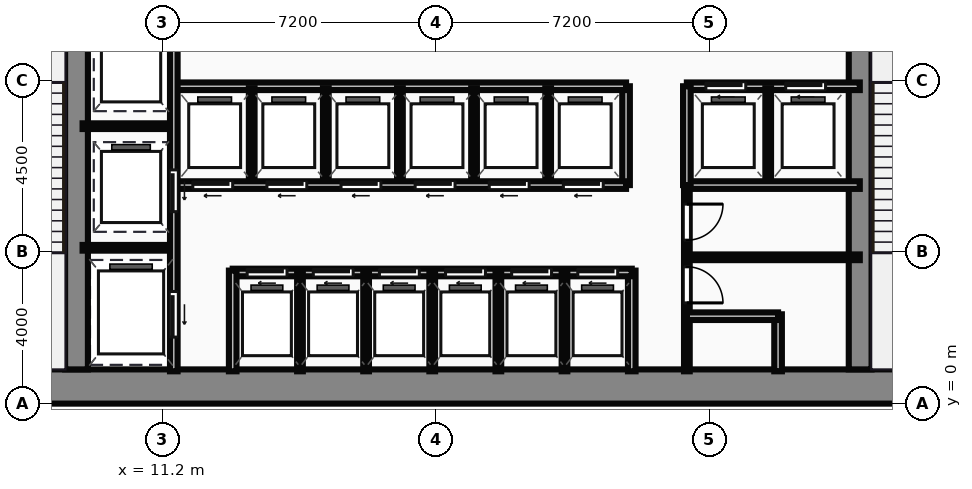
"""IFC4 building model, lengths in metres.
Left out: names, types, materials, properties, quantities, classifications, styles, units other than length and angle.
Written with IfcOpenShell. Run it as: python <this file> out.ifc"""

import sys

from ifc_helpers import new_model, si_unit, direction, frame, frame_2d, origin, place, context, subcontext, project, spatial, rectangle, extrude, source, transform, mapped, element, fill, save


model = new_model("IFC4")
c1 = context("Model", 3, precision=1e-05, world=origin(), true_north=direction((0.0, 1.0)))
c2 = subcontext(c1, "Body", "Model", "MODEL_VIEW")
j1 = project(units=[si_unit("LENGTHUNIT", "METRE"), si_unit("PLANEANGLEUNIT", "RADIAN")], contexts=[c1])
p1 = place(None, origin())
s1 = spatial("IfcSite", under=j1, at=p1, CompositionType="ELEMENT")
p2 = place(p1, origin())
s2 = spatial("IfcBuilding", under=s1, at=p2, CompositionType="ELEMENT")
p3 = place(p2, origin())
s3 = spatial("IfcBuildingStorey", under=s2, at=p3, CompositionType="ELEMENT", Elevation=0.0)
m1 = source(origin(), c2, "Body", "SweptSolid", [
    extrude(rectangle(XDim=29.5, YDim=0.9, at=frame_2d((14.75, 0.0))), origin(), (0.0, 0.0, 1.0), 6.0),
])
p4 = place(p3, frame((4.5, 0.45, 0.0), z_axis=(0.0, 0.0, 1.0), x_axis=(1.0, 0.0, 0.0)))
e1 = element("IfcWall", 1, at=p4, inside=s3, PredefinedType="SHEAR", context=c2, shape_type="MappedRepresentation", body=[
    mapped(m1, transform((0.0, 0.0, 0.0))),
])
m2 = source(origin(), c2, "Body", "SweptSolid", [
    extrude(rectangle(XDim=12.2, YDim=0.6, at=frame_2d((6.1, 0.0))), origin(), (0.0, 0.0, 1.0), 6.0),
])
for number, where, z_axis, x_axis in (
    (2, (8.94, 0.9, 0.0), (0.0, 0.0, 1.0), (0.0, 1.0, 0.0)),
    (3, (29.56, 0.9, 0.0), (0.0, 0.0, 1.0), (0.0, 1.0, 0.0)),
):
    element("IfcWall", number, at=place(p3, frame(where, z_axis=z_axis, x_axis=x_axis)), inside=s3, PredefinedType="SHEAR", context=c2, shape_type="MappedRepresentation", body=[
        mapped(m2, transform((0.0, 0.0, 0.0))),
    ])
m3 = source(origin(), c2, "Body", "SweptSolid", [
    extrude(rectangle(XDim=9.6, YDim=0.2, at=frame_2d((4.8, 0.0))), origin(), (0.0, 0.0, 1.0), 5.7),
])
p5 = place(p3, frame((11.5, 0.85, 0.0), z_axis=(0.0, 0.0, 1.0), x_axis=(0.0, 1.0, 0.0)))
e4 = element("IfcWall", 4, at=p5, inside=s3, PredefinedType="PARTITIONING", context=c2, shape_type="MappedRepresentation", body=[
    mapped(m3, transform((0.0, 0.0, 0.0))),
])
p6 = place(p5, frame((4.2, 0.0, 0.0)))
e5 = element("IfcOpeningElement", 5, at=p6, cuts=e4, PredefinedType="OPENING", context=c2, shape_type="SweptSolid", body=[
    extrude(rectangle(XDim=1.1, YDim=2.15, at=frame_2d((0.55, 1.075))), frame((0.0, 0.11, 0.0), z_axis=(0.0, -1.0, 0.0), x_axis=(1.0, 0.0, 0.0)), (0.0, 0.0, 1.0), 0.22),
])
p7 = place(p5, frame((0.9, 0.0, 0.0)))
e6 = element("IfcOpeningElement", 6, at=p7, cuts=e4, PredefinedType="OPENING", context=c2, shape_type="SweptSolid", body=[
    extrude(rectangle(XDim=1.2, YDim=2.15, at=frame_2d((0.6, 1.075))), frame((0.0, 0.11, 0.0), z_axis=(0.0, -1.0, 0.0), x_axis=(1.0, 0.0, 0.0)), (0.0, 0.0, 1.0), 0.22),
])
m4 = source(origin(), c2, "Body", "SweptSolid", [
    extrude(rectangle(XDim=2.4, YDim=0.15, at=frame_2d((1.2, 0.0))), origin(), (0.0, 0.0, 1.0), 5.7),
])
for number, where, z_axis, x_axis in (
    (7, (9.1, 4.1, 0.0), (0.0, 0.0, 1.0), (1.0, 0.0, 0.0)),
    (8, (9.1, 7.3, 0.0), (0.0, 0.0, 1.0), (1.0, 0.0, 0.0)),
):
    element("IfcWall", number, at=place(p3, frame(where, z_axis=z_axis, x_axis=x_axis)), inside=s3, PredefinedType="PARTITIONING", context=c2, shape_type="MappedRepresentation", body=[
        mapped(m4, transform((0.0, 0.0, 0.0))),
    ])
m5 = source(origin(), c2, "Body", "SweptSolid", [
    extrude(rectangle(XDim=2.65, YDim=0.2, at=frame_2d((1.325, 0.0))), origin(), (0.0, 0.0, 1.0), 5.7),
])
p8 = place(p3, frame((13.05, 0.85, 0.0), z_axis=(0.0, 0.0, 1.0), x_axis=(0.0, 1.0, 0.0)))
e9 = element("IfcWall", 9, at=p8, inside=s3, PredefinedType="PARTITIONING", context=c2, shape_type="MappedRepresentation", body=[
    mapped(m5, transform((0.0, 0.0, 0.0))),
])
m6 = source(origin(), c2, "Body", "SweptSolid", [
    extrude(rectangle(XDim=10.5, YDim=0.2, at=frame_2d((5.25, 0.0))), origin(), (0.0, 0.0, 1.0), 5.7),
])
p9 = place(p3, frame((13.05, 3.45, 0.0), z_axis=(0.0, 0.0, 1.0), x_axis=(1.0, 0.0, 0.0)))
e10 = element("IfcWall", 10, at=p9, inside=s3, PredefinedType="PARTITIONING", context=c2, shape_type="MappedRepresentation", body=[
    mapped(m6, transform((0.0, 0.0, 0.0))),
])
p10 = place(p9, frame((0.38, 0.0, 0.0)))
e11 = element("IfcOpeningElement", 11, at=p10, cuts=e10, PredefinedType="OPENING", context=c2, shape_type="SweptSolid", body=[
    extrude(rectangle(XDim=1.05, YDim=2.15, at=frame_2d((0.525, 1.075))), frame((0.0, 0.11, 0.0), z_axis=(0.0, -1.0, 0.0), x_axis=(1.0, 0.0, 0.0)), (0.0, 0.0, 1.0), 0.22),
])
p11 = place(p9, frame((2.12, 0.0, 0.0)))
e12 = element("IfcOpeningElement", 12, at=p11, cuts=e10, PredefinedType="OPENING", context=c2, shape_type="SweptSolid", body=[
    extrude(rectangle(XDim=1.05, YDim=2.15, at=frame_2d((0.525, 1.075))), frame((0.0, 0.11, 0.0), z_axis=(0.0, -1.0, 0.0), x_axis=(1.0, 0.0, 0.0)), (0.0, 0.0, 1.0), 0.22),
])
p12 = place(p9, frame((3.86, 0.0, 0.0)))
e13 = element("IfcOpeningElement", 13, at=p12, cuts=e10, PredefinedType="OPENING", context=c2, shape_type="SweptSolid", body=[
    extrude(rectangle(XDim=1.05, YDim=2.15, at=frame_2d((0.525, 1.075))), frame((0.0, 0.11, 0.0), z_axis=(0.0, -1.0, 0.0), x_axis=(1.0, 0.0, 0.0)), (0.0, 0.0, 1.0), 0.22),
])
p13 = place(p9, frame((5.6, 0.0, 0.0)))
e14 = element("IfcOpeningElement", 14, at=p13, cuts=e10, PredefinedType="OPENING", context=c2, shape_type="SweptSolid", body=[
    extrude(rectangle(XDim=1.05, YDim=2.15, at=frame_2d((0.525, 1.075))), frame((0.0, 0.11, 0.0), z_axis=(0.0, -1.0, 0.0), x_axis=(1.0, 0.0, 0.0)), (0.0, 0.0, 1.0), 0.22),
])
p14 = place(p9, frame((7.34, 0.0, 0.0)))
e15 = element("IfcOpeningElement", 15, at=p14, cuts=e10, PredefinedType="OPENING", context=c2, shape_type="SweptSolid", body=[
    extrude(rectangle(XDim=1.05, YDim=2.15, at=frame_2d((0.525, 1.075))), frame((0.0, 0.11, 0.0), z_axis=(0.0, -1.0, 0.0), x_axis=(1.0, 0.0, 0.0)), (0.0, 0.0, 1.0), 0.22),
])
p15 = place(p9, frame((9.08, 0.0, 0.0)))
e16 = element("IfcOpeningElement", 16, at=p15, cuts=e10, PredefinedType="OPENING", context=c2, shape_type="SweptSolid", body=[
    extrude(rectangle(XDim=1.05, YDim=2.15, at=frame_2d((0.525, 1.075))), frame((0.0, 0.11, 0.0), z_axis=(0.0, -1.0, 0.0), x_axis=(1.0, 0.0, 0.0)), (0.0, 0.0, 1.0), 0.22),
])
p16 = place(p3, frame((23.55, 0.85, 0.0), z_axis=(0.0, 0.0, 1.0), x_axis=(0.0, 1.0, 0.0)))
e17 = element("IfcWall", 17, at=p16, inside=s3, PredefinedType="PARTITIONING", context=c2, shape_type="MappedRepresentation", body=[
    mapped(m5, transform((0.0, 0.0, 0.0))),
])
m7 = source(origin(), c2, "Body", "SweptSolid", [
    extrude(rectangle(XDim=2.6, YDim=0.15, at=frame_2d((1.3, 0.0))), origin(), (0.0, 0.0, 1.0), 5.7),
])
for number, where, z_axis, x_axis in (
    (18, (14.82, 0.85, 0.0), (0.0, 0.0, 1.0), (0.0, 1.0, 0.0)),
    (19, (16.56, 0.85, 0.0), (0.0, 0.0, 1.0), (0.0, 1.0, 0.0)),
    (20, (18.3, 0.85, 0.0), (0.0, 0.0, 1.0), (0.0, 1.0, 0.0)),
    (21, (20.04, 0.85, 0.0), (0.0, 0.0, 1.0), (0.0, 1.0, 0.0)),
    (22, (21.78, 0.85, 0.0), (0.0, 0.0, 1.0), (0.0, 1.0, 0.0)),
):
    element("IfcWall", number, at=place(p3, frame(where, z_axis=z_axis, x_axis=x_axis)), inside=s3, PredefinedType="PARTITIONING", context=c2, shape_type="MappedRepresentation", body=[
        mapped(m7, transform((0.0, 0.0, 0.0))),
    ])
m8 = source(origin(), c2, "Body", "SweptSolid", [
    extrude(rectangle(XDim=11.85, YDim=0.2, at=frame_2d((5.925, 0.0))), origin(), (0.0, 0.0, 1.0), 5.7),
])
p17 = place(p3, frame((11.55, 5.75, 0.0), z_axis=(0.0, 0.0, 1.0), x_axis=(1.0, 0.0, 0.0)))
e23 = element("IfcWall", 23, at=p17, inside=s3, PredefinedType="PARTITIONING", context=c2, shape_type="MappedRepresentation", body=[
    mapped(m8, transform((0.0, 0.0, 0.0))),
])
p18 = place(p17, frame((0.45, 0.0, 0.0)))
e24 = element("IfcOpeningElement", 24, at=p18, cuts=e23, PredefinedType="OPENING", context=c2, shape_type="SweptSolid", body=[
    extrude(rectangle(XDim=1.05, YDim=2.15, at=frame_2d((0.525, 1.075))), frame((0.0, 0.11, 0.0), z_axis=(0.0, -1.0, 0.0), x_axis=(1.0, 0.0, 0.0)), (0.0, 0.0, 1.0), 0.22),
])
p19 = place(p17, frame((2.4, 0.0, 0.0)))
e25 = element("IfcOpeningElement", 25, at=p19, cuts=e23, PredefinedType="OPENING", context=c2, shape_type="SweptSolid", body=[
    extrude(rectangle(XDim=1.05, YDim=2.15, at=frame_2d((0.525, 1.075))), frame((0.0, 0.11, 0.0), z_axis=(0.0, -1.0, 0.0), x_axis=(1.0, 0.0, 0.0)), (0.0, 0.0, 1.0), 0.22),
])
p20 = place(p17, frame((4.35, 0.0, 0.0)))
e26 = element("IfcOpeningElement", 26, at=p20, cuts=e23, PredefinedType="OPENING", context=c2, shape_type="SweptSolid", body=[
    extrude(rectangle(XDim=1.05, YDim=2.15, at=frame_2d((0.525, 1.075))), frame((0.0, 0.11, 0.0), z_axis=(0.0, -1.0, 0.0), x_axis=(1.0, 0.0, 0.0)), (0.0, 0.0, 1.0), 0.22),
])
p21 = place(p17, frame((6.3, 0.0, 0.0)))
e27 = element("IfcOpeningElement", 27, at=p21, cuts=e23, PredefinedType="OPENING", context=c2, shape_type="SweptSolid", body=[
    extrude(rectangle(XDim=1.05, YDim=2.15, at=frame_2d((0.525, 1.075))), frame((0.0, 0.11, 0.0), z_axis=(0.0, -1.0, 0.0), x_axis=(1.0, 0.0, 0.0)), (0.0, 0.0, 1.0), 0.22),
])
p22 = place(p17, frame((8.25, 0.0, 0.0)))
e28 = element("IfcOpeningElement", 28, at=p22, cuts=e23, PredefinedType="OPENING", context=c2, shape_type="SweptSolid", body=[
    extrude(rectangle(XDim=1.05, YDim=2.15, at=frame_2d((0.525, 1.075))), frame((0.0, 0.11, 0.0), z_axis=(0.0, -1.0, 0.0), x_axis=(1.0, 0.0, 0.0)), (0.0, 0.0, 1.0), 0.22),
])
p23 = place(p17, frame((10.2, 0.0, 0.0)))
e29 = element("IfcOpeningElement", 29, at=p23, cuts=e23, PredefinedType="OPENING", context=c2, shape_type="SweptSolid", body=[
    extrude(rectangle(XDim=1.05, YDim=2.15, at=frame_2d((0.525, 1.075))), frame((0.0, 0.11, 0.0), z_axis=(0.0, -1.0, 0.0), x_axis=(1.0, 0.0, 0.0)), (0.0, 0.0, 1.0), 0.22),
])
p24 = place(p3, frame((11.55, 8.35, 0.0), z_axis=(0.0, 0.0, 1.0), x_axis=(1.0, 0.0, 0.0)))
e30 = element("IfcWall", 30, at=p24, inside=s3, PredefinedType="PARTITIONING", context=c2, shape_type="MappedRepresentation", body=[
    mapped(m8, transform((0.0, 0.0, 0.0))),
])
m9 = source(origin(), c2, "Body", "SweptSolid", [
    extrude(rectangle(XDim=2.6, YDim=0.2, at=frame_2d((1.3, 0.0))), origin(), (0.0, 0.0, 1.0), 5.7),
])
p25 = place(p3, frame((23.4, 5.75, 0.0), z_axis=(0.0, 0.0, 1.0), x_axis=(0.0, 1.0, 0.0)))
e31 = element("IfcWall", 31, at=p25, inside=s3, PredefinedType="PARTITIONING", context=c2, shape_type="MappedRepresentation", body=[
    mapped(m9, transform((0.0, 0.0, 0.0))),
])
m10 = source(origin(), c2, "Body", "SweptSolid", [
    extrude(rectangle(XDim=2.5, YDim=0.15, at=frame_2d((1.25, 0.0))), origin(), (0.0, 0.0, 1.0), 5.7),
])
for number, where, z_axis, x_axis in (
    (32, (13.55, 5.8, 0.0), (0.0, 0.0, 1.0), (0.0, 1.0, 0.0)),
    (33, (15.5, 5.8, 0.0), (0.0, 0.0, 1.0), (0.0, 1.0, 0.0)),
    (34, (17.45, 5.8, 0.0), (0.0, 0.0, 1.0), (0.0, 1.0, 0.0)),
    (35, (19.4, 5.8, 0.0), (0.0, 0.0, 1.0), (0.0, 1.0, 0.0)),
    (36, (21.35, 5.8, 0.0), (0.0, 0.0, 1.0), (0.0, 1.0, 0.0)),
):
    element("IfcWall", number, at=place(p3, frame(where, z_axis=z_axis, x_axis=x_axis)), inside=s3, PredefinedType="PARTITIONING", context=c2, shape_type="MappedRepresentation", body=[
        mapped(m10, transform((0.0, 0.0, 0.0))),
    ])
m11 = source(origin(), c2, "Body", "SweptSolid", [
    extrude(rectangle(XDim=4.55, YDim=0.2, at=frame_2d((2.275, 0.0))), origin(), (0.0, 0.0, 1.0), 5.7),
])
p26 = place(p3, frame((25.0, 8.35, 0.0), z_axis=(0.0, 0.0, 1.0), x_axis=(1.0, 0.0, 0.0)))
e37 = element("IfcWall", 37, at=p26, inside=s3, PredefinedType="PARTITIONING", context=c2, shape_type="MappedRepresentation", body=[
    mapped(m11, transform((0.0, 0.0, 0.0))),
])
p27 = place(p26, frame((0.5, 0.0, 0.0)))
e38 = element("IfcOpeningElement", 38, at=p27, cuts=e37, PredefinedType="OPENING", context=c2, shape_type="SweptSolid", body=[
    extrude(rectangle(XDim=1.05, YDim=2.15, at=frame_2d((0.525, 1.075))), frame((0.0, 0.11, 0.0), z_axis=(0.0, -1.0, 0.0), x_axis=(1.0, 0.0, 0.0)), (0.0, 0.0, 1.0), 0.22),
])
p28 = place(p26, frame((2.6, 0.0, 0.0)))
e39 = element("IfcOpeningElement", 39, at=p28, cuts=e37, PredefinedType="OPENING", context=c2, shape_type="SweptSolid", body=[
    extrude(rectangle(XDim=1.05, YDim=2.15, at=frame_2d((0.525, 1.075))), frame((0.0, 0.11, 0.0), z_axis=(0.0, -1.0, 0.0), x_axis=(1.0, 0.0, 0.0)), (0.0, 0.0, 1.0), 0.22),
])
p29 = place(p3, frame((25.0, 5.75, 0.0), z_axis=(0.0, 0.0, 1.0), x_axis=(1.0, 0.0, 0.0)))
e40 = element("IfcWall", 40, at=p29, inside=s3, PredefinedType="PARTITIONING", context=c2, shape_type="MappedRepresentation", body=[
    mapped(m11, transform((0.0, 0.0, 0.0))),
])
p30 = place(p3, frame((25.0, 5.75, 0.0), z_axis=(0.0, 0.0, 1.0), x_axis=(0.0, 1.0, 0.0)))
e41 = element("IfcWall", 41, at=p30, inside=s3, PredefinedType="PARTITIONING", context=c2, shape_type="MappedRepresentation", body=[
    mapped(m9, transform((0.0, 0.0, 0.0))),
])
p31 = place(p3, frame((27.14, 5.8, 0.0), z_axis=(0.0, 0.0, 1.0), x_axis=(0.0, 1.0, 0.0)))
e42 = element("IfcWall", 42, at=p31, inside=s3, PredefinedType="PARTITIONING", context=c2, shape_type="MappedRepresentation", body=[
    mapped(m10, transform((0.0, 0.0, 0.0))),
])
m12 = source(origin(), c2, "Body", "SweptSolid", [
    extrude(rectangle(XDim=4.9, YDim=0.15, at=frame_2d((2.45, 0.0))), origin(), (0.0, 0.0, 1.0), 5.7),
])
p32 = place(p3, frame((25.0, 0.85, 0.0), z_axis=(0.0, 0.0, 1.0), x_axis=(0.0, 1.0, 0.0)))
e43 = element("IfcWall", 43, at=p32, inside=s3, PredefinedType="PARTITIONING", context=c2, shape_type="MappedRepresentation", body=[
    mapped(m12, transform((0.0, 0.0, 0.0))),
])
p33 = place(p32, frame((1.8, 0.0, 0.0)))
e44 = element("IfcOpeningElement", 44, at=p33, cuts=e43, PredefinedType="OPENING", context=c2, shape_type="SweptSolid", body=[
    extrude(rectangle(XDim=0.95, YDim=2.15, at=frame_2d((0.475, 1.075))), frame((0.0, 0.085, 0.0), z_axis=(0.0, -1.0, 0.0), x_axis=(1.0, 0.0, 0.0)), (0.0, 0.0, 1.0), 0.17),
])
p34 = place(p32, frame((3.45, 0.0, 0.0)))
e45 = element("IfcOpeningElement", 45, at=p34, cuts=e43, PredefinedType="OPENING", context=c2, shape_type="SweptSolid", body=[
    extrude(rectangle(XDim=0.95, YDim=2.15, at=frame_2d((0.475, 1.075))), frame((0.0, 0.085, 0.0), z_axis=(0.0, -1.0, 0.0), x_axis=(1.0, 0.0, 0.0)), (0.0, 0.0, 1.0), 0.17),
])
m13 = source(origin(), c2, "Body", "SweptSolid", [
    extrude(rectangle(XDim=2.4, YDim=0.2, at=frame_2d((1.2, 0.0))), origin(), (0.0, 0.0, 1.0), 5.7),
])
p35 = place(p3, frame((25.0, 2.3, 0.0), z_axis=(0.0, 0.0, 1.0), x_axis=(1.0, 0.0, 0.0)))
e46 = element("IfcWall", 46, at=p35, inside=s3, PredefinedType="PARTITIONING", context=c2, shape_type="MappedRepresentation", body=[
    mapped(m13, transform((0.0, 0.0, 0.0))),
])
m14 = source(origin(), c2, "Body", "SweptSolid", [
    extrude(rectangle(XDim=1.5, YDim=0.2, at=frame_2d((0.75, 0.0))), origin(), (0.0, 0.0, 1.0), 5.7),
])
p36 = place(p3, frame((27.4, 0.85, 0.0), z_axis=(0.0, 0.0, 1.0), x_axis=(0.0, 1.0, 0.0)))
e47 = element("IfcWall", 47, at=p36, inside=s3, PredefinedType="PARTITIONING", context=c2, shape_type="MappedRepresentation", body=[
    mapped(m14, transform((0.0, 0.0, 0.0))),
])
m15 = source(origin(), c2, "Body", "SweptSolid", [
    extrude(rectangle(XDim=4.55, YDim=0.15, at=frame_2d((2.275, 0.0))), origin(), (0.0, 0.0, 1.0), 5.7),
])
p37 = place(p3, frame((25.0, 3.85, 0.0), z_axis=(0.0, 0.0, 1.0), x_axis=(1.0, 0.0, 0.0)))
e48 = element("IfcWall", 48, at=p37, inside=s3, PredefinedType="PARTITIONING", context=c2, shape_type="MappedRepresentation", body=[
    mapped(m15, transform((0.0, 0.0, 0.0))),
])
m16 = source(origin(), c2, "Body", "SweptSolid", [
    extrude(rectangle(XDim=1.1, YDim=2.15, at=frame_2d((0.55, 1.075))), frame((0.0, 0.025, 0.0), z_axis=(0.0, -1.0, 0.0), x_axis=(1.0, 0.0, 0.0)), (0.0, 0.0, 1.0), 0.05),
])
p38 = place(p6, frame((1.1, 0.0, 0.0), z_axis=(0.0, 0.0, 1.0), x_axis=(-1.0, 0.0, 0.0)))
e49 = element("IfcDoor", 49, at=p38, inside=s3, OperationType="SLIDING_TO_LEFT", PredefinedType="DOOR", context=c2, shape_type="MappedRepresentation", body=[
    mapped(m16, transform((0.0, 0.0, 0.0))),
])
fill(e5, e49)
m17 = source(origin(), c2, "Body", "SweptSolid", [
    extrude(rectangle(XDim=1.2, YDim=2.15, at=frame_2d((0.6, 1.075))), frame((0.0, 0.025, 0.0), z_axis=(0.0, -1.0, 0.0), x_axis=(1.0, 0.0, 0.0)), (0.0, 0.0, 1.0), 0.05),
])
p39 = place(p7, frame((1.2, 0.0, 0.0), z_axis=(0.0, 0.0, 1.0), x_axis=(-1.0, 0.0, 0.0)))
e50 = element("IfcDoor", 50, at=p39, inside=s3, OperationType="SLIDING_TO_LEFT", PredefinedType="DOOR", context=c2, shape_type="MappedRepresentation", body=[
    mapped(m17, transform((0.0, 0.0, 0.0))),
])
fill(e6, e50)
m18 = source(origin(), c2, "Body", "SweptSolid", [
    extrude(rectangle(XDim=1.05, YDim=2.15, at=frame_2d((0.525, 1.075))), frame((0.0, 0.025, 0.0), z_axis=(0.0, -1.0, 0.0), x_axis=(1.0, 0.0, 0.0)), (0.0, 0.0, 1.0), 0.05),
])
p40 = place(p10, origin())
e51 = element("IfcDoor", 51, at=p40, inside=s3, OperationType="SLIDING_TO_LEFT", PredefinedType="DOOR", context=c2, shape_type="MappedRepresentation", body=[
    mapped(m18, transform((0.0, 0.0, 0.0))),
])
fill(e11, e51)
p41 = place(p11, origin())
e52 = element("IfcDoor", 52, at=p41, inside=s3, OperationType="SLIDING_TO_LEFT", PredefinedType="DOOR", context=c2, shape_type="MappedRepresentation", body=[
    mapped(m18, transform((0.0, 0.0, 0.0))),
])
fill(e12, e52)
p42 = place(p12, origin())
e53 = element("IfcDoor", 53, at=p42, inside=s3, OperationType="SLIDING_TO_LEFT", PredefinedType="DOOR", context=c2, shape_type="MappedRepresentation", body=[
    mapped(m18, transform((0.0, 0.0, 0.0))),
])
fill(e13, e53)
p43 = place(p13, origin())
e54 = element("IfcDoor", 54, at=p43, inside=s3, OperationType="SLIDING_TO_LEFT", PredefinedType="DOOR", context=c2, shape_type="MappedRepresentation", body=[
    mapped(m18, transform((0.0, 0.0, 0.0))),
])
fill(e14, e54)
p44 = place(p14, origin())
e55 = element("IfcDoor", 55, at=p44, inside=s3, OperationType="SLIDING_TO_LEFT", PredefinedType="DOOR", context=c2, shape_type="MappedRepresentation", body=[
    mapped(m18, transform((0.0, 0.0, 0.0))),
])
fill(e15, e55)
p45 = place(p15, origin())
e56 = element("IfcDoor", 56, at=p45, inside=s3, OperationType="SLIDING_TO_LEFT", PredefinedType="DOOR", context=c2, shape_type="MappedRepresentation", body=[
    mapped(m18, transform((0.0, 0.0, 0.0))),
])
fill(e16, e56)
p46 = place(p18, frame((1.05, 0.0, 0.0), z_axis=(0.0, 0.0, 1.0), x_axis=(-1.0, 0.0, 0.0)))
e57 = element("IfcDoor", 57, at=p46, inside=s3, OperationType="SLIDING_TO_LEFT", PredefinedType="DOOR", context=c2, shape_type="MappedRepresentation", body=[
    mapped(m18, transform((0.0, 0.0, 0.0))),
])
fill(e24, e57)
p47 = place(p19, frame((1.05, 0.0, 0.0), z_axis=(0.0, 0.0, 1.0), x_axis=(-1.0, 0.0, 0.0)))
e58 = element("IfcDoor", 58, at=p47, inside=s3, OperationType="SLIDING_TO_LEFT", PredefinedType="DOOR", context=c2, shape_type="MappedRepresentation", body=[
    mapped(m18, transform((0.0, 0.0, 0.0))),
])
fill(e25, e58)
p48 = place(p20, frame((1.05, 0.0, 0.0), z_axis=(0.0, 0.0, 1.0), x_axis=(-1.0, 0.0, 0.0)))
e59 = element("IfcDoor", 59, at=p48, inside=s3, OperationType="SLIDING_TO_LEFT", PredefinedType="DOOR", context=c2, shape_type="MappedRepresentation", body=[
    mapped(m18, transform((0.0, 0.0, 0.0))),
])
fill(e26, e59)
p49 = place(p21, frame((1.05, 0.0, 0.0), z_axis=(0.0, 0.0, 1.0), x_axis=(-1.0, 0.0, 0.0)))
e60 = element("IfcDoor", 60, at=p49, inside=s3, OperationType="SLIDING_TO_LEFT", PredefinedType="DOOR", context=c2, shape_type="MappedRepresentation", body=[
    mapped(m18, transform((0.0, 0.0, 0.0))),
])
fill(e27, e60)
p50 = place(p22, frame((1.05, 0.0, 0.0), z_axis=(0.0, 0.0, 1.0), x_axis=(-1.0, 0.0, 0.0)))
e61 = element("IfcDoor", 61, at=p50, inside=s3, OperationType="SLIDING_TO_LEFT", PredefinedType="DOOR", context=c2, shape_type="MappedRepresentation", body=[
    mapped(m18, transform((0.0, 0.0, 0.0))),
])
fill(e28, e61)
p51 = place(p23, frame((1.05, 0.0, 0.0), z_axis=(0.0, 0.0, 1.0), x_axis=(-1.0, 0.0, 0.0)))
e62 = element("IfcDoor", 62, at=p51, inside=s3, OperationType="SLIDING_TO_LEFT", PredefinedType="DOOR", context=c2, shape_type="MappedRepresentation", body=[
    mapped(m18, transform((0.0, 0.0, 0.0))),
])
fill(e29, e62)
p52 = place(p27, origin())
e63 = element("IfcDoor", 63, at=p52, inside=s3, OperationType="SLIDING_TO_LEFT", PredefinedType="DOOR", context=c2, shape_type="MappedRepresentation", body=[
    mapped(m18, transform((0.0, 0.0, 0.0))),
])
fill(e38, e63)
p53 = place(p28, origin())
e64 = element("IfcDoor", 64, at=p53, inside=s3, OperationType="SLIDING_TO_LEFT", PredefinedType="DOOR", context=c2, shape_type="MappedRepresentation", body=[
    mapped(m18, transform((0.0, 0.0, 0.0))),
])
fill(e39, e64)
m19 = source(origin(), c2, "Body", "SweptSolid", [
    extrude(rectangle(XDim=0.95, YDim=2.15, at=frame_2d((0.475, 1.075))), frame((0.0, 0.025, 0.0), z_axis=(0.0, -1.0, 0.0), x_axis=(1.0, 0.0, 0.0)), (0.0, 0.0, 1.0), 0.05),
])
p54 = place(p33, origin())
e65 = element("IfcDoor", 65, at=p54, inside=s3, OperationType="SINGLE_SWING_LEFT", PredefinedType="DOOR", context=c2, shape_type="MappedRepresentation", body=[
    mapped(m19, transform((0.0, 0.0, 0.0))),
])
fill(e44, e65)
p55 = place(p34, origin())
e66 = element("IfcDoor", 66, at=p55, inside=s3, OperationType="SINGLE_SWING_RIGHT", PredefinedType="DOOR", context=c2, shape_type="MappedRepresentation", body=[
    mapped(m19, transform((0.0, 0.0, 0.0))),
])
fill(e45, e66)
save(model, sys.argv[1])
